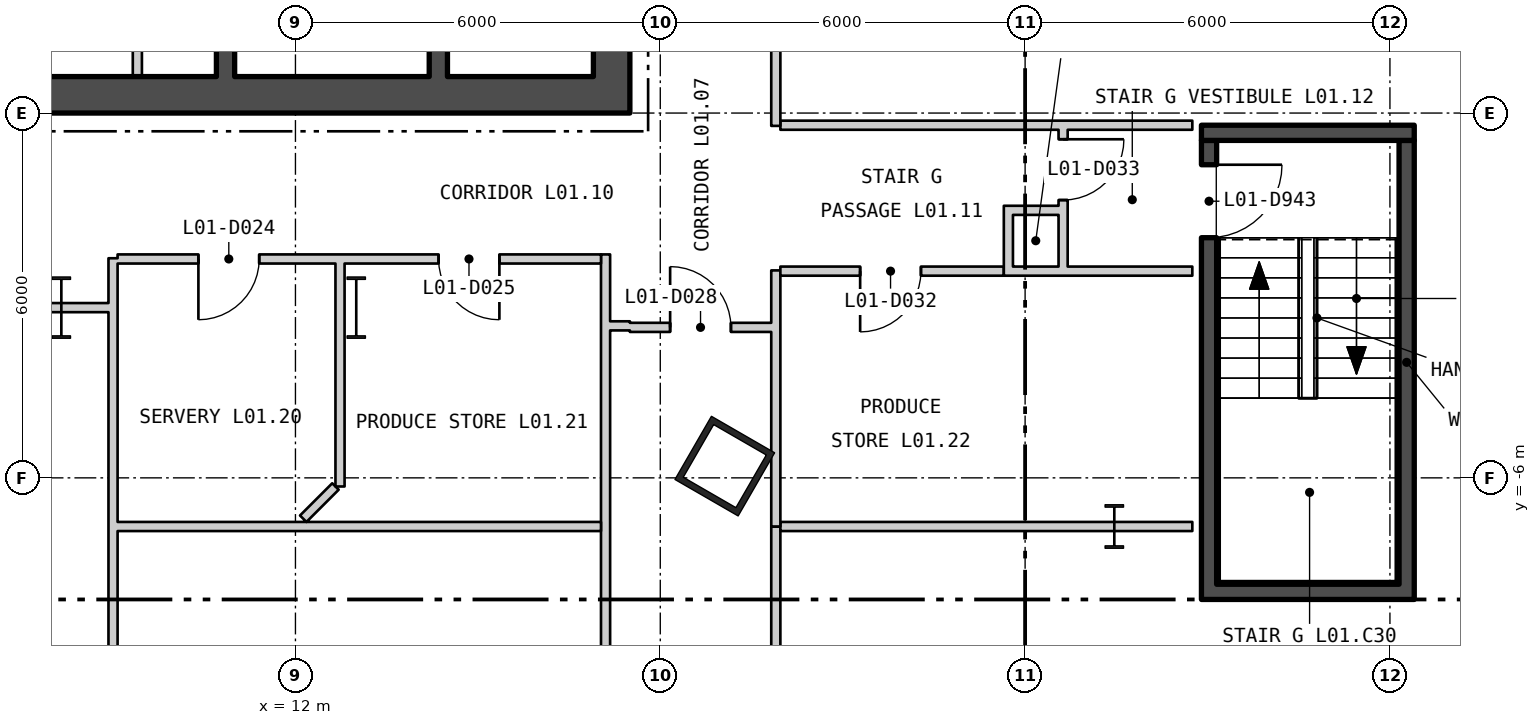
"""IFC4 building model, lengths in metres.
Left out: names, types, materials, properties, quantities, classifications, styles, units other than length and angle.
Written with IfcOpenShell. Run it as: python <this file> out.ifc"""

import sys

from ifc_helpers import new_model, si_unit, direction, frame, frame_2d, origin, origin_2d, place, context, subcontext, project, spatial, rectangle, hollow_rectangle, i_section, extrude, element, fill, save


model = new_model("IFC4")
c1 = context("Model", 3, precision=1e-05, world=origin(), true_north=direction((0.0, 1.0)))
c2 = subcontext(c1, "Body", "Model", "MODEL_VIEW")
j1 = project(units=[si_unit("LENGTHUNIT", "METRE"), si_unit("PLANEANGLEUNIT", "RADIAN")], contexts=[c1])
p1 = place(None, origin())
s1 = spatial("IfcSite", under=j1, at=p1, CompositionType="ELEMENT")
p2 = place(p1, origin())
s2 = spatial("IfcBuilding", under=s1, at=p2, CompositionType="ELEMENT")
p3 = place(p2, frame((0.0, 0.0, 8.4)))
s3 = spatial("IfcBuildingStorey", under=s2, at=p3, CompositionType="ELEMENT", Elevation=8.4)
p4 = place(p3, frame((19.061, -5.807, 0.0), z_axis=(0.0, 0.0, 1.0), x_axis=(0.5, 0.866025403784, 0.0)))
e1 = element("IfcColumn", 1, at=p4, inside=s3, PredefinedType="COLUMN", context=c2, shape_type="SweptSolid", body=[
    extrude(hollow_rectangle(XDim=1.2, YDim=1.2, WallThickness=0.1, at=origin_2d()), origin(), (0.0, 0.0, 1.0), 5.1),
])
for number, where, z_axis, x_axis in (
    (2, (8.15, -3.2, 0.0), (0.0, 0.0, 1.0), (1.0, 0.0, 0.0)),
    (3, (13.0, -3.2, 0.0), (0.0, 0.0, 1.0), (1.0, 0.0, 0.0)),
):
    element("IfcColumn", number, at=place(p3, frame(where, z_axis=z_axis, x_axis=x_axis)), inside=s3, PredefinedType="COLUMN", context=c2, shape_type="SweptSolid", body=[
        extrude(i_section(OverallWidth=0.302, OverallDepth=1.008, WebThickness=0.021, FlangeThickness=0.04, at=origin_2d()), origin(), (0.0, 0.0, 1.0), 5.1),
    ])
p5 = place(p3, frame((25.467, -6.8, 0.0), z_axis=(0.0, 0.0, 1.0), x_axis=(1.0, 0.0, 0.0)))
e4 = element("IfcColumn", 4, at=p5, inside=s3, PredefinedType="COLUMN", context=c2, shape_type="SweptSolid", body=[
    extrude(i_section(OverallWidth=0.304, OverallDepth=0.716, WebThickness=0.021, FlangeThickness=0.04, at=origin_2d()), origin(), (0.0, 0.0, 1.0), 5.1),
])
p6 = place(p3, frame((-17.5, 0.3, 0.0), z_axis=(0.0, 0.0, 1.0), x_axis=(1.0, 0.0, 0.0)))
e5 = element("IfcWall", 5, at=p6, inside=s3, PredefinedType="SHEAR", context=c2, shape_type="SweptSolid", body=[
    extrude(rectangle(XDim=35.0, YDim=0.6, at=frame_2d((17.5, 0.0))), origin(), (0.0, 0.0, 1.0), 4.88),
])
p7 = place(p6, frame((12.0, 0.0, 0.0)))
e6 = element("IfcOpeningElement", 6, at=p7, cuts=e5, PredefinedType="OPENING", context=c2, shape_type="SweptSolid", body=[
    extrude(rectangle(XDim=1.8, YDim=2.4, at=frame_2d((0.9, 1.2))), frame((0.0, 0.31, 0.0), z_axis=(0.0, -1.0, 0.0), x_axis=(1.0, 0.0, 0.0)), (0.0, 0.0, 1.0), 0.62),
])
p8 = place(p6, frame((22.0, 0.0, 0.0)))
e7 = element("IfcOpeningElement", 7, at=p8, cuts=e5, PredefinedType="OPENING", context=c2, shape_type="SweptSolid", body=[
    extrude(rectangle(XDim=1.8, YDim=2.4, at=frame_2d((0.9, 1.2))), frame((0.0, 0.31, 0.0), z_axis=(0.0, -1.0, 0.0), x_axis=(1.0, 0.0, 0.0)), (0.0, 0.0, 1.0), 0.62),
])
p9 = place(p3, frame((17.2, 0.6, 0.0), z_axis=(0.0, 0.0, 1.0), x_axis=(0.0, 1.0, 0.0)))
e8 = element("IfcWall", 8, at=p9, inside=s3, PredefinedType="SHEAR", context=c2, shape_type="SweptSolid", body=[
    extrude(rectangle(XDim=16.8, YDim=0.6, at=frame_2d((8.4, 0.0))), origin(), (0.0, 0.0, 1.0), 4.88),
])
p10 = place(p9, frame((5.7, 0.0, 0.0)))
e9 = element("IfcOpeningElement", 9, at=p10, cuts=e8, PredefinedType="OPENING", context=c2, shape_type="SweptSolid", body=[
    extrude(rectangle(XDim=1.5, YDim=2.1, at=frame_2d((0.75, 1.05))), frame((0.0, 0.31, 0.0), z_axis=(0.0, -1.0, 0.0), x_axis=(1.0, 0.0, 0.0)), (0.0, 0.0, 1.0), 0.62),
])
p11 = place(p9, frame((0.618, 0.0, 0.0)))
e10 = element("IfcOpeningElement", 10, at=p11, cuts=e8, PredefinedType="OPENING", context=c2, shape_type="SweptSolid", body=[
    extrude(rectangle(XDim=1.0, YDim=2.1, at=frame_2d((0.5, 1.05))), frame((0.0, 0.31, 0.0), z_axis=(0.0, -1.0, 0.0), x_axis=(1.0, 0.0, 0.0)), (0.0, 0.0, 1.0), 0.62),
])
p12 = place(p9, frame((3.518, 0.0, 0.0)))
e11 = element("IfcOpeningElement", 11, at=p12, cuts=e8, PredefinedType="OPENING", context=c2, shape_type="SweptSolid", body=[
    extrude(rectangle(XDim=0.9, YDim=2.1, at=frame_2d((0.45, 1.05))), frame((0.0, 0.31, 0.0), z_axis=(0.0, -1.0, 0.0), x_axis=(1.0, 0.0, 0.0)), (0.0, 0.0, 1.0), 0.62),
])
p13 = place(p9, frame((8.853, 0.0, 0.0)))
e12 = element("IfcOpeningElement", 12, at=p13, cuts=e8, PredefinedType="OPENING", context=c2, shape_type="SweptSolid", body=[
    extrude(rectangle(XDim=0.9, YDim=2.1, at=frame_2d((0.45, 1.05))), frame((0.0, 0.31, 0.0), z_axis=(0.0, -1.0, 0.0), x_axis=(1.0, 0.0, 0.0)), (0.0, 0.0, 1.0), 0.62),
])
p14 = place(p9, frame((13.653, 0.0, 0.0)))
e13 = element("IfcOpeningElement", 13, at=p14, cuts=e8, PredefinedType="OPENING", context=c2, shape_type="SweptSolid", body=[
    extrude(rectangle(XDim=0.9, YDim=2.1, at=frame_2d((0.45, 1.05))), frame((0.0, 0.31, 0.0), z_axis=(0.0, -1.0, 0.0), x_axis=(1.0, 0.0, 0.0)), (0.0, 0.0, 1.0), 0.62),
])
p15 = place(p3, frame((10.85, 0.6, 0.0), z_axis=(0.0, 0.0, 1.0), x_axis=(0.0, 1.0, 0.0)))
e14 = element("IfcWall", 14, at=p15, inside=s3, PredefinedType="SHEAR", context=c2, shape_type="SweptSolid", body=[
    extrude(rectangle(XDim=16.8, YDim=0.3, at=frame_2d((8.4, 0.0))), origin(), (0.0, 0.0, 1.0), 4.88),
])
p16 = place(p15, frame((5.075, 0.0, 0.0)))
e15 = element("IfcOpeningElement", 15, at=p16, cuts=e14, PredefinedType="OPENING", context=c2, shape_type="SweptSolid", body=[
    extrude(rectangle(XDim=1.25, YDim=2.1, at=frame_2d((0.625, 1.05))), frame((0.0, 0.16, 0.0), z_axis=(0.0, -1.0, 0.0), x_axis=(1.0, 0.0, 0.0)), (0.0, 0.0, 1.0), 0.32),
])
p17 = place(p15, frame((1.525, 0.0, 0.0)))
e16 = element("IfcOpeningElement", 16, at=p17, cuts=e14, PredefinedType="OPENING", context=c2, shape_type="SweptSolid", body=[
    extrude(rectangle(XDim=1.0, YDim=2.1, at=frame_2d((0.5, 1.05))), frame((0.0, 0.16, 0.0), z_axis=(0.0, -1.0, 0.0), x_axis=(1.0, 0.0, 0.0)), (0.0, 0.0, 1.0), 0.32),
])
p18 = place(p3, frame((14.35, 0.6, 0.0), z_axis=(0.0, 0.0, 1.0), x_axis=(0.0, 1.0, 0.0)))
e17 = element("IfcWall", 17, at=p18, inside=s3, PredefinedType="SHEAR", context=c2, shape_type="SweptSolid", body=[
    extrude(rectangle(XDim=16.8, YDim=0.3, at=frame_2d((8.4, 0.0))), origin(), (0.0, 0.0, 1.0), 4.88),
])
p19 = place(p18, frame((5.7, 0.0, 0.0)))
e18 = element("IfcOpeningElement", 18, at=p19, cuts=e17, PredefinedType="OPENING", context=c2, shape_type="SweptSolid", body=[
    extrude(rectangle(XDim=1.5, YDim=2.1, at=frame_2d((0.75, 1.05))), frame((0.0, 0.16, 0.0), z_axis=(0.0, -1.0, 0.0), x_axis=(1.0, 0.0, 0.0)), (0.0, 0.0, 1.0), 0.32),
])
p20 = place(p3, frame((9.4, 0.6, 0.0), z_axis=(0.0, 0.0, 1.0), x_axis=(0.0, 1.0, 0.0)))
e19 = element("IfcWall", 19, at=p20, inside=s3, PredefinedType="PARTITIONING", context=c2, shape_type="SweptSolid", body=[
    extrude(rectangle(XDim=3.075, YDim=0.15, at=frame_2d((1.538, 0.0))), origin(), (0.0, 0.0, 1.0), 4.88),
])
p21 = place(p3, frame((27.025, -7.75, 0.0), z_axis=(0.0, 0.0, 1.0), x_axis=(0.0, 1.0, 0.0)))
e20 = element("IfcWall", 20, at=p21, inside=s3, PredefinedType="SHEAR", context=c2, shape_type="SweptSolid", body=[
    extrude(rectangle(XDim=7.3, YDim=0.25, at=frame_2d((3.65, 0.0))), origin(), (0.0, 0.0, 1.0), 4.88),
])
p22 = place(p21, frame((5.7, 0.0, 0.0)))
e21 = element("IfcOpeningElement", 21, at=p22, cuts=e20, PredefinedType="OPENING", context=c2, shape_type="SweptSolid", body=[
    extrude(rectangle(XDim=1.2, YDim=2.1, at=frame_2d((0.6, 1.05))), frame((0.0, 0.135, 0.0), z_axis=(0.0, -1.0, 0.0), x_axis=(1.0, 0.0, 0.0)), (0.0, 0.0, 1.0), 0.27),
])
p23 = place(p3, frame((30.275, -7.75, 0.0), z_axis=(0.0, 0.0, 1.0), x_axis=(0.0, 1.0, 0.0)))
e22 = element("IfcWall", 22, at=p23, inside=s3, PredefinedType="SHEAR", context=c2, shape_type="SweptSolid", body=[
    extrude(rectangle(XDim=7.3, YDim=0.25, at=frame_2d((3.65, 0.0))), origin(), (0.0, 0.0, 1.0), 4.88),
])
for number, where, z_axis, x_axis in (
    (23, (26.9, -7.875, 0.0), (0.0, 0.0, 1.0), (1.0, 0.0, 0.0)),
    (24, (26.9, -0.325, 0.0), (0.0, 0.0, 1.0), (1.0, 0.0, 0.0)),
):
    element("IfcWall", number, at=place(p3, frame(where, z_axis=z_axis, x_axis=x_axis)), inside=s3, PredefinedType="SHEAR", context=c2, shape_type="SweptSolid", body=[
        extrude(rectangle(XDim=3.5, YDim=0.25, at=frame_2d((1.75, 0.0))), origin(), (0.0, 0.0, 1.0), 4.88),
    ])
p24 = place(p3, frame((5.925, -3.2, 0.0), z_axis=(0.0, 0.0, 1.0), x_axis=(1.0, 0.0, 0.0)))
e25 = element("IfcWall", 25, at=p24, inside=s3, PredefinedType="PARTITIONING", context=c2, shape_type="SweptSolid", body=[
    extrude(rectangle(XDim=2.225, YDim=0.15, at=frame_2d((1.113, 0.0))), origin(), (0.0, 0.0, 1.0), 3.97),
])
p25 = place(p24, frame((0.713, 0.0, 0.0)))
e26 = element("IfcOpeningElement", 26, at=p25, cuts=e25, PredefinedType="OPENING", context=c2, shape_type="SweptSolid", body=[
    extrude(rectangle(XDim=1.0, YDim=2.1, at=frame_2d((0.5, 1.05))), frame((0.0, 0.085, 0.0), z_axis=(0.0, -1.0, 0.0), x_axis=(1.0, 0.0, 0.0)), (0.0, 0.0, 1.0), 0.17),
])
p26 = place(p3, frame((8.15, -3.2, 0.0), z_axis=(0.0, 0.0, 1.0), x_axis=(1.0, 0.0, 0.0)))
e27 = element("IfcWall", 27, at=p26, inside=s3, PredefinedType="PARTITIONING", context=c2, shape_type="SweptSolid", body=[
    extrude(rectangle(XDim=0.775, YDim=0.15, at=frame_2d((0.388, 0.0))), origin(), (0.0, 0.0, 1.0), 4.09),
])
p27 = place(p3, frame((9.0, -13.675, 0.0), z_axis=(0.0, 0.0, 1.0), x_axis=(0.0, 1.0, 0.0)))
e28 = element("IfcWall", 28, at=p27, inside=s3, PredefinedType="PARTITIONING", context=c2, shape_type="SweptSolid", body=[
    extrude(rectangle(XDim=11.287, YDim=0.15, at=frame_2d((5.644, 0.0))), origin(), (0.0, 0.0, 1.0), 4.88),
])
p28 = place(p27, frame((2.498, 0.0, 0.0)))
e29 = element("IfcOpeningElement", 29, at=p28, cuts=e28, PredefinedType="OPENING", context=c2, shape_type="SweptSolid", body=[
    extrude(rectangle(XDim=1.8, YDim=2.1, at=frame_2d((0.9, 1.05))), frame((0.0, 0.085, 0.0), z_axis=(0.0, -1.0, 0.0), x_axis=(1.0, 0.0, 0.0)), (0.0, 0.0, 1.0), 0.17),
])
p29 = place(p3, frame((9.075, -6.8, 0.0), z_axis=(0.0, 0.0, 1.0), x_axis=(1.0, 0.0, 0.0)))
e30 = element("IfcWall", 30, at=p29, inside=s3, PredefinedType="PARTITIONING", context=c2, shape_type="SweptSolid", body=[
    extrude(rectangle(XDim=7.95, YDim=0.15, at=frame_2d((3.975, 0.0))), origin(), (0.0, 0.0, 1.0), 4.88),
])
p30 = place(p3, frame((9.075, -2.4, 0.0), z_axis=(0.0, 0.0, 1.0), x_axis=(1.0, 0.0, 0.0)))
e31 = element("IfcWall", 31, at=p30, inside=s3, PredefinedType="PARTITIONING", context=c2, shape_type="SweptSolid", body=[
    extrude(rectangle(XDim=7.95, YDim=0.15, at=frame_2d((3.975, 0.0))), origin(), (0.0, 0.0, 1.0), 4.88),
])
p31 = place(p30, frame((1.329, 0.0, 0.0)))
e32 = element("IfcOpeningElement", 32, at=p31, cuts=e31, PredefinedType="OPENING", context=c2, shape_type="SweptSolid", body=[
    extrude(rectangle(XDim=1.0, YDim=2.1, at=frame_2d((0.5, 1.05))), frame((0.0, 0.085, 0.0), z_axis=(0.0, -1.0, 0.0), x_axis=(1.0, 0.0, 0.0)), (0.0, 0.0, 1.0), 0.17),
])
p32 = place(p30, frame((5.279, 0.0, 0.0)))
e33 = element("IfcOpeningElement", 33, at=p32, cuts=e31, PredefinedType="OPENING", context=c2, shape_type="SweptSolid", body=[
    extrude(rectangle(XDim=1.0, YDim=2.1, at=frame_2d((0.5, 1.05))), frame((0.0, 0.085, 0.0), z_axis=(0.0, -1.0, 0.0), x_axis=(1.0, 0.0, 0.0)), (0.0, 0.0, 1.0), 0.17),
])
p33 = place(p3, frame((12.128, -6.672, 0.0), z_axis=(0.0, 0.0, 1.0), x_axis=(0.707106781187, 0.707106781187, 0.0)))
e34 = element("IfcWall", 34, at=p33, inside=s3, PredefinedType="PARTITIONING", context=c2, shape_type="SweptSolid", body=[
    extrude(rectangle(XDim=0.75, YDim=0.15, at=frame_2d((0.375, 0.0))), origin(), (0.0, 0.0, 1.0), 4.88),
])
p34 = place(p3, frame((12.733, -6.142, 0.0), z_axis=(0.0, 0.0, 1.0), x_axis=(0.0, 1.0, 0.0)))
e35 = element("IfcWall", 35, at=p34, inside=s3, PredefinedType="PARTITIONING", context=c2, shape_type="SweptSolid", body=[
    extrude(rectangle(XDim=3.042, YDim=0.15, at=frame_2d((1.521, 0.0))), origin(), (0.0, 0.0, 1.0), 4.19),
])
p35 = place(p3, frame((12.733, -3.1, 0.0), z_axis=(0.0, 0.0, 1.0), x_axis=(0.0, 1.0, 0.0)))
e36 = element("IfcWall", 36, at=p35, inside=s3, PredefinedType="PARTITIONING", context=c2, shape_type="SweptSolid", body=[
    extrude(rectangle(XDim=0.625, YDim=0.15, at=frame_2d((0.312, 0.0))), origin(), (0.0, 0.0, 1.0), 4.28),
])
p36 = place(p3, frame((17.1, -21.375, 0.0), z_axis=(0.0, 0.0, 1.0), x_axis=(0.0, 1.0, 0.0)))
e37 = element("IfcWall", 37, at=p36, inside=s3, PredefinedType="PARTITIONING", context=c2, shape_type="SweptSolid", body=[
    extrude(rectangle(XDim=19.05, YDim=0.15, at=frame_2d((9.525, 0.0))), origin(), (0.0, 0.0, 1.0), 4.88),
])
p37 = place(p3, frame((17.175, -3.5, 0.0), z_axis=(0.0, 0.0, 1.0), x_axis=(1.0, 0.0, 0.0)))
e38 = element("IfcWall", 38, at=p37, inside=s3, PredefinedType="PARTITIONING", context=c2, shape_type="SweptSolid", body=[
    extrude(rectangle(XDim=0.325, YDim=0.15, at=frame_2d((0.163, 0.0))), origin(), (0.0, 0.0, 1.0), 4.88),
])
p38 = place(p3, frame((17.5, -3.525, 0.0), z_axis=(0.0, 0.0, 1.0), x_axis=(1.0, 0.0, 0.0)))
e39 = element("IfcWall", 39, at=p38, inside=s3, PredefinedType="PARTITIONING", context=c2, shape_type="SweptSolid", body=[
    extrude(rectangle(XDim=2.325, YDim=0.15, at=frame_2d((1.163, 0.0))), origin(), (0.0, 0.0, 1.0), 4.88),
])
p39 = place(p38, frame((0.662, 0.0, 0.0)))
e40 = element("IfcOpeningElement", 40, at=p39, cuts=e39, PredefinedType="OPENING", context=c2, shape_type="SweptSolid", body=[
    extrude(rectangle(XDim=1.0, YDim=2.1, at=frame_2d((0.5, 1.05))), frame((0.0, 0.085, 0.0), z_axis=(0.0, -1.0, 0.0), x_axis=(1.0, 0.0, 0.0)), (0.0, 0.0, 1.0), 0.17),
])
p40 = place(p3, frame((19.9, -23.775, 0.0), z_axis=(0.0, 0.0, 1.0), x_axis=(0.0, 1.0, 0.0)))
e41 = element("IfcWall", 41, at=p40, inside=s3, PredefinedType="PARTITIONING", context=c2, shape_type="SweptSolid", body=[
    extrude(rectangle(XDim=16.972, YDim=0.15, at=frame_2d((8.486, 0.0))), origin(), (0.0, 0.0, 1.0), 4.88),
])
p41 = place(p40, frame((3.548, 0.0, 0.0)))
e42 = element("IfcOpeningElement", 42, at=p41, cuts=e41, PredefinedType="OPENING", context=c2, shape_type="SweptSolid", body=[
    extrude(rectangle(XDim=1.8, YDim=2.1, at=frame_2d((0.9, 1.05))), frame((0.0, 0.085, 0.0), z_axis=(0.0, -1.0, 0.0), x_axis=(1.0, 0.0, 0.0)), (0.0, 0.0, 1.0), 0.17),
])
p42 = place(p3, frame((19.9, -6.8, 0.0), z_axis=(0.0, 0.0, 1.0), x_axis=(0.0, 1.0, 0.0)))
e43 = element("IfcWall", 43, at=p42, inside=s3, PredefinedType="PARTITIONING", context=c2, shape_type="SweptSolid", body=[
    extrude(rectangle(XDim=4.212, YDim=0.15, at=frame_2d((2.106, 0.0))), origin(), (0.0, 0.0, 1.0), 4.88),
])
p43 = place(p3, frame((19.9, -0.211, 0.0), z_axis=(0.0, 0.0, 1.0), x_axis=(0.0, 1.0, 0.0)))
e44 = element("IfcWall", 44, at=p43, inside=s3, PredefinedType="PARTITIONING", context=c2, shape_type="SweptSolid", body=[
    extrude(rectangle(XDim=18.136, YDim=0.15, at=frame_2d((9.068, 0.0))), origin(), (0.0, 0.0, 1.0), 4.88),
])
p44 = place(p43, frame((8.174, 0.0, 0.0)))
e45 = element("IfcOpeningElement", 45, at=p44, cuts=e44, PredefinedType="OPENING", context=c2, shape_type="SweptSolid", body=[
    extrude(rectangle(XDim=1.0, YDim=2.1, at=frame_2d((0.5, 1.05))), frame((0.0, 0.085, 0.0), z_axis=(0.0, -1.0, 0.0), x_axis=(1.0, 0.0, 0.0)), (0.0, 0.0, 1.0), 0.17),
])
p45 = place(p3, frame((19.975, -6.8, 0.0), z_axis=(0.0, 0.0, 1.0), x_axis=(1.0, 0.0, 0.0)))
e46 = element("IfcWall", 46, at=p45, inside=s3, PredefinedType="PARTITIONING", context=c2, shape_type="SweptSolid", body=[
    extrude(rectangle(XDim=6.775, YDim=0.15, at=frame_2d((3.388, 0.0))), origin(), (0.0, 0.0, 1.0), 4.09),
])
p46 = place(p3, frame((19.975, -2.6, 0.0), z_axis=(0.0, 0.0, 1.0), x_axis=(1.0, 0.0, 0.0)))
e47 = element("IfcWall", 47, at=p46, inside=s3, PredefinedType="PARTITIONING", context=c2, shape_type="SweptSolid", body=[
    extrude(rectangle(XDim=3.675, YDim=0.15, at=frame_2d((1.837, 0.0))), origin(), (0.0, 0.0, 1.0), 4.88),
])
p47 = place(p46, frame((1.312, 0.0, 0.0)))
e48 = element("IfcOpeningElement", 48, at=p47, cuts=e47, PredefinedType="OPENING", context=c2, shape_type="SweptSolid", body=[
    extrude(rectangle(XDim=1.0, YDim=2.1, at=frame_2d((0.5, 1.05))), frame((0.0, 0.085, 0.0), z_axis=(0.0, -1.0, 0.0), x_axis=(1.0, 0.0, 0.0)), (0.0, 0.0, 1.0), 0.17),
])
p48 = place(p3, frame((19.975, -0.2, 0.0), z_axis=(0.0, 0.0, 1.0), x_axis=(1.0, 0.0, 0.0)))
e49 = element("IfcWall", 49, at=p48, inside=s3, PredefinedType="PARTITIONING", context=c2, shape_type="SweptSolid", body=[
    extrude(rectangle(XDim=6.775, YDim=0.15, at=frame_2d((3.388, 0.0))), origin(), (0.0, 0.0, 1.0), 4.88),
])
p49 = place(p3, frame((23.725, -2.675, 0.0), z_axis=(0.0, 0.0, 1.0), x_axis=(0.0, 1.0, 0.0)))
e50 = element("IfcWall", 50, at=p49, inside=s3, PredefinedType="PARTITIONING", context=c2, shape_type="SweptSolid", body=[
    extrude(rectangle(XDim=1.15, YDim=0.15, at=frame_2d((0.575, 0.0))), origin(), (0.0, 0.0, 1.0), 4.88),
])
for number, where, z_axis, x_axis in (
    (51, (23.8, -2.6, 0.0), (0.0, 0.0, 1.0), (1.0, 0.0, 0.0)),
    (52, (23.8, -1.6, 0.0), (0.0, 0.0, 1.0), (1.0, 0.0, 0.0)),
):
    element("IfcWall", number, at=place(p3, frame(where, z_axis=z_axis, x_axis=x_axis)), inside=s3, PredefinedType="PARTITIONING", context=c2, shape_type="SweptSolid", body=[
        extrude(rectangle(XDim=0.75, YDim=0.15, at=frame_2d((0.375, 0.0))), origin(), (0.0, 0.0, 1.0), 4.88),
    ])
p50 = place(p3, frame((24.625, -2.675, 0.0), z_axis=(0.0, 0.0, 1.0), x_axis=(0.0, 1.0, 0.0)))
e53 = element("IfcWall", 53, at=p50, inside=s3, PredefinedType="PARTITIONING", context=c2, shape_type="SweptSolid", body=[
    extrude(rectangle(XDim=1.087, YDim=0.15, at=frame_2d((0.543, 0.0))), origin(), (0.0, 0.0, 1.0), 4.88),
])
p51 = place(p3, frame((24.625, -1.588, 0.0), z_axis=(0.0, 0.0, 1.0), x_axis=(0.0, 1.0, 0.0)))
e54 = element("IfcWall", 54, at=p51, inside=s3, PredefinedType="PARTITIONING", context=c2, shape_type="SweptSolid", body=[
    extrude(rectangle(XDim=1.313, YDim=0.15, at=frame_2d((0.656, 0.0))), origin(), (0.0, 0.0, 1.0), 4.88),
])
p52 = place(p51, frame((0.157, 0.0, 0.0)))
e55 = element("IfcOpeningElement", 55, at=p52, cuts=e54, PredefinedType="OPENING", context=c2, shape_type="SweptSolid", body=[
    extrude(rectangle(XDim=1.0, YDim=2.1, at=frame_2d((0.5, 1.05))), frame((0.0, 0.085, 0.0), z_axis=(0.0, -1.0, 0.0), x_axis=(1.0, 0.0, 0.0)), (0.0, 0.0, 1.0), 0.17),
])
p53 = place(p3, frame((24.7, -2.6, 0.0), z_axis=(0.0, 0.0, 1.0), x_axis=(1.0, 0.0, 0.0)))
e56 = element("IfcWall", 56, at=p53, inside=s3, PredefinedType="PARTITIONING", context=c2, shape_type="SweptSolid", body=[
    extrude(rectangle(XDim=2.05, YDim=0.15, at=frame_2d((1.025, 0.0))), origin(), (0.0, 0.0, 1.0), 4.88),
])
p54 = place(p22, origin())
e57 = element("IfcDoor", 57, at=p54, inside=s3, OperationType="SINGLE_SWING_RIGHT", PredefinedType="DOOR", context=c2, shape_type="SweptSolid", body=[
    extrude(rectangle(XDim=1.2, YDim=2.1, at=frame_2d((0.6, 1.05))), frame((0.0, 0.025, 0.0), z_axis=(0.0, -1.0, 0.0), x_axis=(1.0, 0.0, 0.0)), (0.0, 0.0, 1.0), 0.05),
])
fill(e21, e57)
p55 = place(p31, origin())
e58 = element("IfcDoor", 58, at=p55, inside=s3, OperationType="SINGLE_SWING_LEFT", PredefinedType="DOOR", context=c2, shape_type="SweptSolid", body=[
    extrude(rectangle(XDim=1.0, YDim=2.1, at=frame_2d((0.5, 1.05))), frame((0.0, 0.025, 0.0), z_axis=(0.0, -1.0, 0.0), x_axis=(1.0, 0.0, 0.0)), (0.0, 0.0, 1.0), 0.05),
])
fill(e32, e58)
p56 = place(p32, origin())
e59 = element("IfcDoor", 59, at=p56, inside=s3, OperationType="SINGLE_SWING_RIGHT", PredefinedType="DOOR", context=c2, shape_type="SweptSolid", body=[
    extrude(rectangle(XDim=1.0, YDim=2.1, at=frame_2d((0.5, 1.05))), frame((0.0, 0.025, 0.0), z_axis=(0.0, -1.0, 0.0), x_axis=(1.0, 0.0, 0.0)), (0.0, 0.0, 1.0), 0.05),
])
fill(e33, e59)
p57 = place(p39, origin())
e60 = element("IfcDoor", 60, at=p57, inside=s3, OperationType="SINGLE_SWING_RIGHT", PredefinedType="DOOR", context=c2, shape_type="SweptSolid", body=[
    extrude(rectangle(XDim=1.0, YDim=2.1, at=frame_2d((0.5, 1.05))), frame((0.0, 0.025, 0.0), z_axis=(0.0, -1.0, 0.0), x_axis=(1.0, 0.0, 0.0)), (0.0, 0.0, 1.0), 0.05),
])
fill(e40, e60)
p58 = place(p47, origin())
e61 = element("IfcDoor", 61, at=p58, inside=s3, OperationType="SINGLE_SWING_LEFT", PredefinedType="DOOR", context=c2, shape_type="SweptSolid", body=[
    extrude(rectangle(XDim=1.0, YDim=2.1, at=frame_2d((0.5, 1.05))), frame((0.0, 0.025, 0.0), z_axis=(0.0, -1.0, 0.0), x_axis=(1.0, 0.0, 0.0)), (0.0, 0.0, 1.0), 0.05),
])
fill(e48, e61)
p59 = place(p52, origin())
e62 = element("IfcDoor", 62, at=p59, inside=s3, OperationType="SINGLE_SWING_RIGHT", PredefinedType="DOOR", context=c2, shape_type="SweptSolid", body=[
    extrude(rectangle(XDim=1.0, YDim=2.1, at=frame_2d((0.5, 1.05))), frame((0.0, 0.025, 0.0), z_axis=(0.0, -1.0, 0.0), x_axis=(1.0, 0.0, 0.0)), (0.0, 0.0, 1.0), 0.05),
])
fill(e55, e62)
save(model, sys.argv[1])
